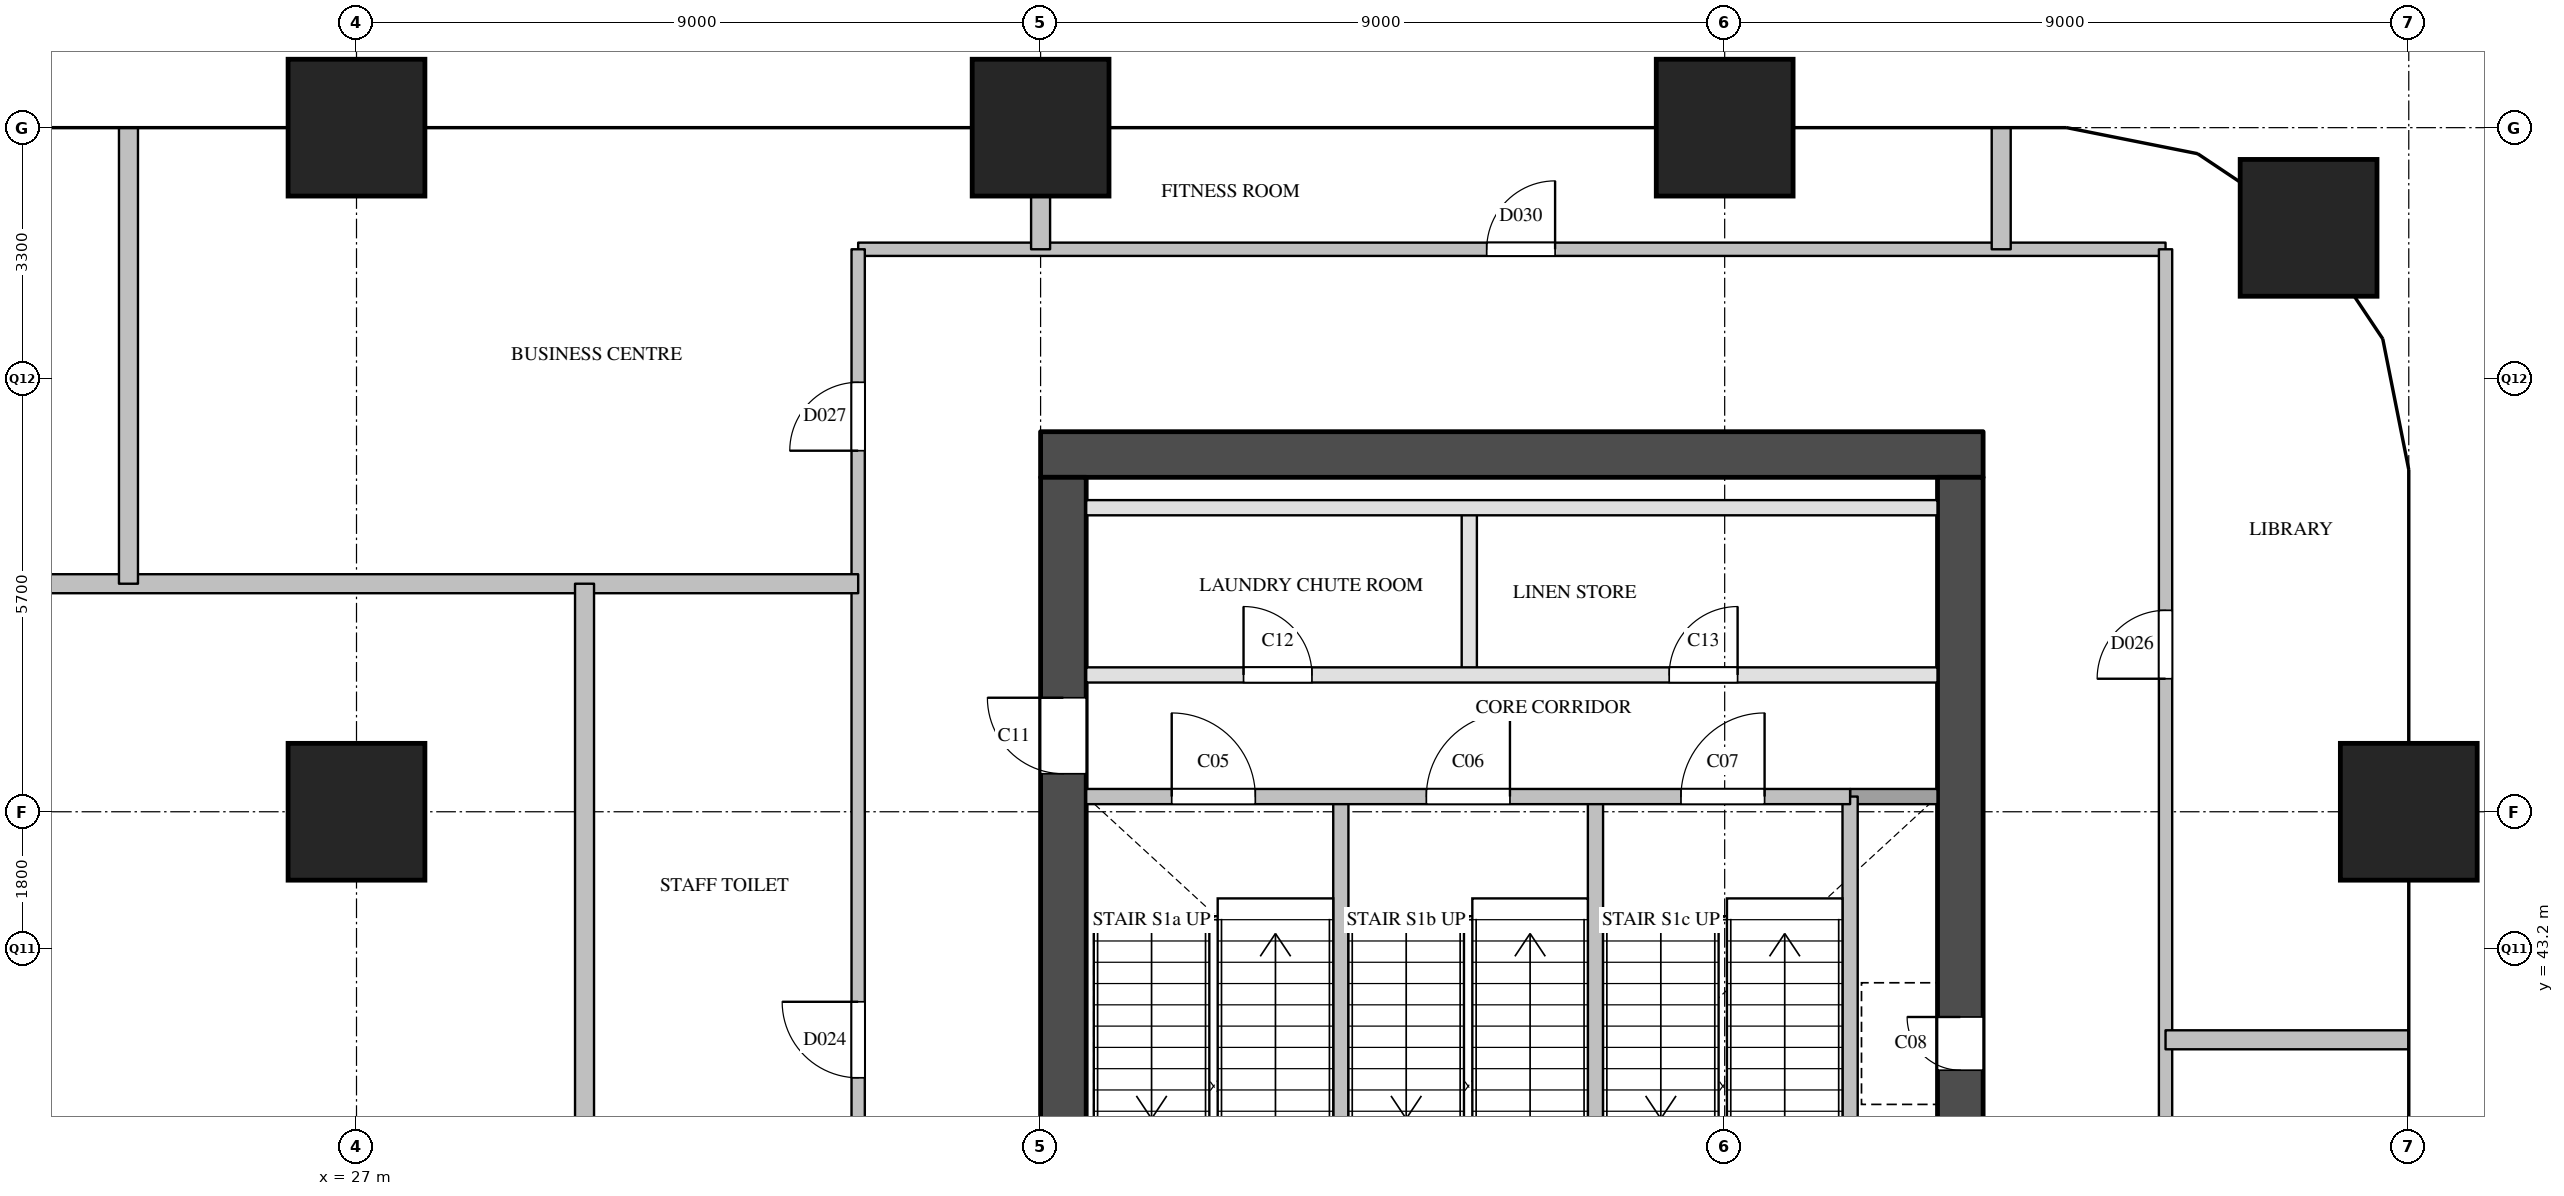
"""IFC4 building model, lengths in metres.
Left out: names, types, materials, properties, quantities, classifications, styles, units other than length and angle.
Written with IfcOpenShell. Run it as: python <this file> out.ifc"""

import sys

from ifc_helpers import new_model, si_unit, direction, frame, frame_2d, origin, origin_2d, place, context, subcontext, project, spatial, rectangle, extrude, element, fill, save


model = new_model("IFC4")
c1 = context("Model", 3, precision=1e-05, world=origin(), true_north=direction((0.0, 1.0)))
c2 = subcontext(c1, "Body", "Model", "MODEL_VIEW")
j1 = project(units=[si_unit("LENGTHUNIT", "METRE"), si_unit("PLANEANGLEUNIT", "RADIAN")], contexts=[c1])
p1 = place(None, origin())
s1 = spatial("IfcSite", under=j1, at=p1, CompositionType="ELEMENT")
p2 = place(p1, origin())
s2 = spatial("IfcBuilding", under=s1, at=p2, CompositionType="ELEMENT")
p3 = place(p2, frame((0.0, 0.0, 65.2)))
s3 = spatial("IfcBuildingStorey", under=s2, at=p3, CompositionType="ELEMENT", Elevation=65.2)
for number, where, z_axis, x_axis in (
    (1, (27.0, 45.0, 0.0), (0.0, 0.0, 1.0), (1.0, 0.0, 0.0)),
    (2, (27.0, 54.0, 0.0), (0.0, 0.0, 1.0), (1.0, 0.0, 0.0)),
    (3, (36.0, 54.0, 0.0), (0.0, 0.0, 1.0), (1.0, 0.0, 0.0)),
    (4, (45.0, 54.0, 0.0), (0.0, 0.0, 1.0), (1.0, 0.0, 0.0)),
    (5, (54.0, 45.0, 0.0), (0.0, 0.0, 1.0), (1.0, 0.0, 0.0)),
    (6, (52.682, 52.682, 0.0), (0.0, 0.0, 1.0), (1.0, 0.0, 0.0)),
):
    element("IfcColumn", number, at=place(p3, frame(where, z_axis=z_axis, x_axis=x_axis)), inside=s3, PredefinedType="COLUMN", context=c2, shape_type="SweptSolid", body=[
        extrude(rectangle(XDim=1.8, YDim=1.8, at=origin_2d()), origin(), (0.0, 0.0, 1.0), 3.8),
    ])
p4 = place(p3, frame((36.0, 49.7, 0.0), z_axis=(0.0, 0.0, 1.0), x_axis=(1.0, 0.0, 0.0)))
e7 = element("IfcWall", 7, at=p4, inside=s3, PredefinedType="SHEAR", context=c2, shape_type="SweptSolid", body=[
    extrude(rectangle(XDim=12.4, YDim=0.6, at=frame_2d((6.2, 0.0))), origin(), (0.0, 0.0, 1.0), 3.5),
])
p5 = place(p3, frame((36.3, 29.1, 0.0), z_axis=(0.0, 0.0, 1.0), x_axis=(0.0, 1.0, 0.0)))
e8 = element("IfcWall", 8, at=p5, inside=s3, PredefinedType="SHEAR", context=c2, shape_type="SweptSolid", body=[
    extrude(rectangle(XDim=20.3, YDim=0.6, at=frame_2d((10.15, 0.0))), origin(), (0.0, 0.0, 1.0), 3.5),
])
p6 = place(p5, frame((3.6, 0.0, 0.0)))
e9 = element("IfcOpeningElement", 9, at=p6, cuts=e8, PredefinedType="OPENING", context=c2, shape_type="SweptSolid", body=[
    extrude(rectangle(XDim=1.8, YDim=2.1, at=frame_2d((0.9, 1.05))), frame((0.0, 0.31, 0.0), z_axis=(0.0, -1.0, 0.0), x_axis=(1.0, 0.0, 0.0)), (0.0, 0.0, 1.0), 0.62),
])
p7 = place(p5, frame((16.4, 0.0, 0.0)))
e10 = element("IfcOpeningElement", 10, at=p7, cuts=e8, PredefinedType="OPENING", context=c2, shape_type="SweptSolid", body=[
    extrude(rectangle(XDim=1.0, YDim=2.1, at=frame_2d((0.5, 1.05))), frame((0.0, 0.31, 0.0), z_axis=(0.0, -1.0, 0.0), x_axis=(1.0, 0.0, 0.0)), (0.0, 0.0, 1.0), 0.62),
])
p8 = place(p3, frame((48.1, 29.1, 0.0), z_axis=(0.0, 0.0, 1.0), x_axis=(0.0, 1.0, 0.0)))
e11 = element("IfcWall", 11, at=p8, inside=s3, PredefinedType="SHEAR", context=c2, shape_type="SweptSolid", body=[
    extrude(rectangle(XDim=20.3, YDim=0.6, at=frame_2d((10.15, 0.0))), origin(), (0.0, 0.0, 1.0), 3.5),
])
p9 = place(p8, frame((12.5, 0.0, 0.0)))
e12 = element("IfcOpeningElement", 12, at=p9, cuts=e11, PredefinedType="OPENING", context=c2, shape_type="SweptSolid", body=[
    extrude(rectangle(XDim=0.7, YDim=2.1, at=frame_2d((0.35, 1.05))), frame((0.0, 0.31, 0.0), z_axis=(0.0, -1.0, 0.0), x_axis=(1.0, 0.0, 0.0)), (0.0, 0.0, 1.0), 0.62),
])
p10 = place(p8, frame((3.9, 0.0, 0.0)))
e13 = element("IfcOpeningElement", 13, at=p10, cuts=e11, PredefinedType="OPENING", context=c2, shape_type="SweptSolid", body=[
    extrude(rectangle(XDim=1.8, YDim=2.1, at=frame_2d((0.9, 1.05))), frame((0.0, 0.31, 0.0), z_axis=(0.0, -1.0, 0.0), x_axis=(1.0, 0.0, 0.0)), (0.0, 0.0, 1.0), 0.62),
])
p11 = place(p3, frame((39.95, 40.78, 0.0), z_axis=(0.0, 0.0, 1.0), x_axis=(0.0, 1.0, 0.0)))
e14 = element("IfcWall", 14, at=p11, inside=s3, PredefinedType="SOLIDWALL", context=c2, shape_type="SweptSolid", body=[
    extrude(rectangle(XDim=4.42, YDim=0.2, at=frame_2d((2.21, 0.0))), origin(), (0.0, 0.0, 1.0), 3.5),
])
p12 = place(p3, frame((41.64, 46.8, 0.0), z_axis=(0.0, 0.0, 1.0), x_axis=(0.0, 1.0, 0.0)))
e15 = element("IfcWall", 15, at=p12, inside=s3, PredefinedType="PARTITIONING", context=c2, shape_type="SweptSolid", body=[
    extrude(rectangle(XDim=2.2, YDim=0.2, at=frame_2d((1.1, 0.0))), origin(), (0.0, 0.0, 1.0), 3.5),
])
for number, where, z_axis, x_axis in (
    (16, (43.3, 40.78, 0.0), (0.0, 0.0, 1.0), (0.0, 1.0, 0.0)),
    (17, (46.65, 40.78, 0.0), (0.0, 0.0, 1.0), (0.0, 1.0, 0.0)),
):
    element("IfcWall", number, at=place(p3, frame(where, z_axis=z_axis, x_axis=x_axis)), inside=s3, PredefinedType="SOLIDWALL", context=c2, shape_type="SweptSolid", body=[
        extrude(rectangle(XDim=4.42, YDim=0.2, at=frame_2d((2.21, 0.0))), origin(), (0.0, 0.0, 1.0), 3.5),
    ])
p13 = place(p3, frame((46.65, 45.2, 0.0), z_axis=(0.0, 0.0, 1.0), x_axis=(1.0, 0.0, 0.0)))
e18 = element("IfcWall", 18, at=p13, inside=s3, PredefinedType="SOLIDWALL", context=c2, shape_type="SweptSolid", body=[
    extrude(rectangle(XDim=1.15, YDim=0.2, at=frame_2d((0.575, 0.0))), origin(), (0.0, 0.0, 1.0), 3.5),
])
p14 = place(p3, frame((36.6, 45.2, 0.0), z_axis=(0.0, 0.0, 1.0), x_axis=(1.0, 0.0, 0.0)))
e19 = element("IfcWall", 19, at=p14, inside=s3, PredefinedType="SOLIDWALL", context=c2, shape_type="SweptSolid", body=[
    extrude(rectangle(XDim=10.05, YDim=0.2, at=frame_2d((5.025, 0.0))), origin(), (0.0, 0.0, 1.0), 3.5),
])
p15 = place(p14, frame((1.125, 0.0, 0.0)))
e20 = element("IfcOpeningElement", 20, at=p15, cuts=e19, PredefinedType="OPENING", context=c2, shape_type="SweptSolid", body=[
    extrude(rectangle(XDim=1.1, YDim=2.1, at=frame_2d((0.55, 1.05))), frame((0.0, 0.11, 0.0), z_axis=(0.0, -1.0, 0.0), x_axis=(1.0, 0.0, 0.0)), (0.0, 0.0, 1.0), 0.22),
])
p16 = place(p14, frame((4.475, 0.0, 0.0)))
e21 = element("IfcOpeningElement", 21, at=p16, cuts=e19, PredefinedType="OPENING", context=c2, shape_type="SweptSolid", body=[
    extrude(rectangle(XDim=1.1, YDim=2.1, at=frame_2d((0.55, 1.05))), frame((0.0, 0.11, 0.0), z_axis=(0.0, -1.0, 0.0), x_axis=(1.0, 0.0, 0.0)), (0.0, 0.0, 1.0), 0.22),
])
p17 = place(p14, frame((7.825, 0.0, 0.0)))
e22 = element("IfcOpeningElement", 22, at=p17, cuts=e19, PredefinedType="OPENING", context=c2, shape_type="SweptSolid", body=[
    extrude(rectangle(XDim=1.1, YDim=2.1, at=frame_2d((0.55, 1.05))), frame((0.0, 0.11, 0.0), z_axis=(0.0, -1.0, 0.0), x_axis=(1.0, 0.0, 0.0)), (0.0, 0.0, 1.0), 0.22),
])
p18 = place(p3, frame((36.6, 46.8, 0.0), z_axis=(0.0, 0.0, 1.0), x_axis=(1.0, 0.0, 0.0)))
e23 = element("IfcWall", 23, at=p18, inside=s3, PredefinedType="PARTITIONING", context=c2, shape_type="SweptSolid", body=[
    extrude(rectangle(XDim=11.2, YDim=0.2, at=frame_2d((5.6, 0.0))), origin(), (0.0, 0.0, 1.0), 3.5),
])
p19 = place(p18, frame((2.07, 0.0, 0.0)))
e24 = element("IfcOpeningElement", 24, at=p19, cuts=e23, PredefinedType="OPENING", context=c2, shape_type="SweptSolid", body=[
    extrude(rectangle(XDim=0.9, YDim=2.1, at=frame_2d((0.45, 1.05))), frame((0.0, 0.11, 0.0), z_axis=(0.0, -1.0, 0.0), x_axis=(1.0, 0.0, 0.0)), (0.0, 0.0, 1.0), 0.22),
])
p20 = place(p18, frame((7.67, 0.0, 0.0)))
e25 = element("IfcOpeningElement", 25, at=p20, cuts=e23, PredefinedType="OPENING", context=c2, shape_type="SweptSolid", body=[
    extrude(rectangle(XDim=0.9, YDim=2.1, at=frame_2d((0.45, 1.05))), frame((0.0, 0.11, 0.0), z_axis=(0.0, -1.0, 0.0), x_axis=(1.0, 0.0, 0.0)), (0.0, 0.0, 1.0), 0.22),
])
p21 = place(p3, frame((36.6, 49.0, 0.0), z_axis=(0.0, 0.0, 1.0), x_axis=(1.0, 0.0, 0.0)))
e26 = element("IfcWall", 26, at=p21, inside=s3, PredefinedType="PARTITIONING", context=c2, shape_type="SweptSolid", body=[
    extrude(rectangle(XDim=11.2, YDim=0.2, at=frame_2d((5.6, 0.0))), origin(), (0.0, 0.0, 1.0), 3.5),
])
p22 = place(p3, frame((33.6, 52.4, 0.0), z_axis=(0.0, 0.0, 1.0), x_axis=(1.0, 0.0, 0.0)))
e27 = element("IfcWall", 27, at=p22, inside=s3, PredefinedType="PARTITIONING", context=c2, shape_type="SweptSolid", body=[
    extrude(rectangle(XDim=17.2, YDim=0.175, at=frame_2d((8.6, 0.0))), origin(), (0.0, 0.0, 1.0), 3.5),
])
p23 = place(p22, frame((8.269, 0.0, 0.0)))
e28 = element("IfcOpeningElement", 28, at=p23, cuts=e27, PredefinedType="OPENING", context=c2, shape_type="SweptSolid", body=[
    extrude(rectangle(XDim=0.9, YDim=2.1, at=frame_2d((0.45, 1.05))), frame((0.0, 0.097, 0.0), z_axis=(0.0, -1.0, 0.0), x_axis=(1.0, 0.0, 0.0)), (0.0, 0.0, 1.0), 0.195),
])
p24 = place(p3, frame((33.6, 26.1, 0.0), z_axis=(0.0, 0.0, 1.0), x_axis=(0.0, 1.0, 0.0)))
e29 = element("IfcWall", 29, at=p24, inside=s3, PredefinedType="PARTITIONING", context=c2, shape_type="SweptSolid", body=[
    extrude(rectangle(XDim=26.3, YDim=0.175, at=frame_2d((13.15, 0.0))), origin(), (0.0, 0.0, 1.0), 2.5),
])
p25 = place(p24, frame((4.5, 0.0, 0.0)))
e30 = element("IfcOpeningElement", 30, at=p25, cuts=e29, PredefinedType="OPENING", context=c2, shape_type="SweptSolid", body=[
    extrude(rectangle(XDim=0.9, YDim=2.1, at=frame_2d((0.45, 1.05))), frame((0.0, 0.097, 0.0), z_axis=(0.0, -1.0, 0.0), x_axis=(1.0, 0.0, 0.0)), (0.0, 0.0, 1.0), 0.195),
])
p26 = place(p24, frame((15.4, 0.0, 0.0)))
e31 = element("IfcOpeningElement", 31, at=p26, cuts=e29, PredefinedType="OPENING", context=c2, shape_type="SweptSolid", body=[
    extrude(rectangle(XDim=1.0, YDim=2.1, at=frame_2d((0.5, 1.05))), frame((0.0, 0.097, 0.0), z_axis=(0.0, -1.0, 0.0), x_axis=(1.0, 0.0, 0.0)), (0.0, 0.0, 1.0), 0.195),
])
p27 = place(p24, frame((23.65, 0.0, 0.0)))
e32 = element("IfcOpeningElement", 32, at=p27, cuts=e29, PredefinedType="OPENING", context=c2, shape_type="SweptSolid", body=[
    extrude(rectangle(XDim=0.9, YDim=2.1, at=frame_2d((0.45, 1.05))), frame((0.0, 0.097, 0.0), z_axis=(0.0, -1.0, 0.0), x_axis=(1.0, 0.0, 0.0)), (0.0, 0.0, 1.0), 0.195),
])
p28 = place(p3, frame((50.8, 26.1, 0.0), z_axis=(0.0, 0.0, 1.0), x_axis=(0.0, 1.0, 0.0)))
e33 = element("IfcWall", 33, at=p28, inside=s3, PredefinedType="PARTITIONING", context=c2, shape_type="SweptSolid", body=[
    extrude(rectangle(XDim=26.3, YDim=0.175, at=frame_2d((13.15, 0.0))), origin(), (0.0, 0.0, 1.0), 2.5),
])
p29 = place(p28, frame((4.5, 0.0, 0.0)))
e34 = element("IfcOpeningElement", 34, at=p29, cuts=e33, PredefinedType="OPENING", context=c2, shape_type="SweptSolid", body=[
    extrude(rectangle(XDim=0.9, YDim=2.1, at=frame_2d((0.45, 1.05))), frame((0.0, 0.097, 0.0), z_axis=(0.0, -1.0, 0.0), x_axis=(1.0, 0.0, 0.0)), (0.0, 0.0, 1.0), 0.195),
])
p30 = place(p28, frame((12.45, 0.0, 0.0)))
e35 = element("IfcOpeningElement", 35, at=p30, cuts=e33, PredefinedType="OPENING", context=c2, shape_type="SweptSolid", body=[
    extrude(rectangle(XDim=0.9, YDim=2.1, at=frame_2d((0.45, 1.05))), frame((0.0, 0.097, 0.0), z_axis=(0.0, -1.0, 0.0), x_axis=(1.0, 0.0, 0.0)), (0.0, 0.0, 1.0), 0.195),
])
p31 = place(p28, frame((20.65, 0.0, 0.0)))
e36 = element("IfcOpeningElement", 36, at=p31, cuts=e33, PredefinedType="OPENING", context=c2, shape_type="SweptSolid", body=[
    extrude(rectangle(XDim=0.9, YDim=2.1, at=frame_2d((0.45, 1.05))), frame((0.0, 0.097, 0.0), z_axis=(0.0, -1.0, 0.0), x_axis=(1.0, 0.0, 0.0)), (0.0, 0.0, 1.0), 0.195),
])
p32 = place(p3, frame((50.8, 42.0, 0.0), z_axis=(0.0, 0.0, 1.0), x_axis=(1.0, 0.0, 0.0)))
e37 = element("IfcWall", 37, at=p32, inside=s3, PredefinedType="PARTITIONING", context=c2, shape_type="SweptSolid", body=[
    extrude(rectangle(XDim=3.2, YDim=0.25, at=frame_2d((1.6, 0.0))), origin(), (0.0, 0.0, 1.0), 2.5),
])
p33 = place(p3, frame((20.4, 48.0, 0.0), z_axis=(0.0, 0.0, 1.0), x_axis=(1.0, 0.0, 0.0)))
e38 = element("IfcWall", 38, at=p33, inside=s3, PredefinedType="PARTITIONING", context=c2, shape_type="SweptSolid", body=[
    extrude(rectangle(XDim=13.2, YDim=0.25, at=frame_2d((6.6, 0.0))), origin(), (0.0, 0.0, 1.0), 2.5),
])
p34 = place(p3, frame((24.0, 48.0, 0.0), z_axis=(0.0, 0.0, 1.0), x_axis=(0.0, 1.0, 0.0)))
e39 = element("IfcWall", 39, at=p34, inside=s3, PredefinedType="PARTITIONING", context=c2, shape_type="SweptSolid", body=[
    extrude(rectangle(XDim=6.0, YDim=0.25, at=frame_2d((3.0, 0.0))), origin(), (0.0, 0.0, 1.0), 2.5),
])
p35 = place(p3, frame((30.0, 36.0, 0.0), z_axis=(0.0, 0.0, 1.0), x_axis=(0.0, 1.0, 0.0)))
e40 = element("IfcWall", 40, at=p35, inside=s3, PredefinedType="PARTITIONING", context=c2, shape_type="SweptSolid", body=[
    extrude(rectangle(XDim=12.0, YDim=0.25, at=frame_2d((6.0, 0.0))), origin(), (0.0, 0.0, 1.0), 3.5),
])
p36 = place(p3, frame((36.0, 52.4, 0.0), z_axis=(0.0, 0.0, 1.0), x_axis=(0.0, 1.0, 0.0)))
e41 = element("IfcWall", 41, at=p36, inside=s3, PredefinedType="PARTITIONING", context=c2, shape_type="SweptSolid", body=[
    extrude(rectangle(XDim=1.6, YDim=0.25, at=frame_2d((0.8, 0.0))), origin(), (0.0, 0.0, 1.0), 3.5),
])
p37 = place(p3, frame((48.638, 52.4, 0.0), z_axis=(0.0, 0.0, 1.0), x_axis=(0.0, 1.0, 0.0)))
e42 = element("IfcWall", 42, at=p37, inside=s3, PredefinedType="PARTITIONING", context=c2, shape_type="SweptSolid", body=[
    extrude(rectangle(XDim=1.6, YDim=0.25, at=frame_2d((0.8, 0.0))), origin(), (0.0, 0.0, 1.0), 2.5),
])
p38 = place(p15, origin())
e43 = element("IfcDoor", 43, at=p38, inside=s3, OperationType="SINGLE_SWING_LEFT", PredefinedType="DOOR", context=c2, shape_type="SweptSolid", body=[
    extrude(rectangle(XDim=1.1, YDim=2.1, at=frame_2d((0.55, 1.05))), frame((0.0, 0.025, 0.0), z_axis=(0.0, -1.0, 0.0), x_axis=(1.0, 0.0, 0.0)), (0.0, 0.0, 1.0), 0.05),
])
fill(e20, e43)
p39 = place(p16, origin())
e44 = element("IfcDoor", 44, at=p39, inside=s3, OperationType="SINGLE_SWING_RIGHT", PredefinedType="DOOR", context=c2, shape_type="SweptSolid", body=[
    extrude(rectangle(XDim=1.1, YDim=2.1, at=frame_2d((0.55, 1.05))), frame((0.0, 0.025, 0.0), z_axis=(0.0, -1.0, 0.0), x_axis=(1.0, 0.0, 0.0)), (0.0, 0.0, 1.0), 0.05),
])
fill(e21, e44)
p40 = place(p17, origin())
e45 = element("IfcDoor", 45, at=p40, inside=s3, OperationType="SINGLE_SWING_RIGHT", PredefinedType="DOOR", context=c2, shape_type="SweptSolid", body=[
    extrude(rectangle(XDim=1.1, YDim=2.1, at=frame_2d((0.55, 1.05))), frame((0.0, 0.025, 0.0), z_axis=(0.0, -1.0, 0.0), x_axis=(1.0, 0.0, 0.0)), (0.0, 0.0, 1.0), 0.05),
])
fill(e22, e45)
p41 = place(p9, origin())
e46 = element("IfcDoor", 46, at=p41, inside=s3, OperationType="SINGLE_SWING_RIGHT", PredefinedType="DOOR", context=c2, shape_type="SweptSolid", body=[
    extrude(rectangle(XDim=0.7, YDim=2.1, at=frame_2d((0.35, 1.05))), frame((0.0, 0.025, 0.0), z_axis=(0.0, -1.0, 0.0), x_axis=(1.0, 0.0, 0.0)), (0.0, 0.0, 1.0), 0.05),
])
fill(e12, e46)
p42 = place(p7, origin())
e47 = element("IfcDoor", 47, at=p42, inside=s3, OperationType="SINGLE_SWING_RIGHT", PredefinedType="DOOR", context=c2, shape_type="SweptSolid", body=[
    extrude(rectangle(XDim=1.0, YDim=2.1, at=frame_2d((0.5, 1.05))), frame((0.0, 0.025, 0.0), z_axis=(0.0, -1.0, 0.0), x_axis=(1.0, 0.0, 0.0)), (0.0, 0.0, 1.0), 0.05),
])
fill(e10, e47)
p43 = place(p19, origin())
e48 = element("IfcDoor", 48, at=p43, inside=s3, OperationType="SINGLE_SWING_LEFT", PredefinedType="DOOR", context=c2, shape_type="SweptSolid", body=[
    extrude(rectangle(XDim=0.9, YDim=2.1, at=frame_2d((0.45, 1.05))), frame((0.0, 0.025, 0.0), z_axis=(0.0, -1.0, 0.0), x_axis=(1.0, 0.0, 0.0)), (0.0, 0.0, 1.0), 0.05),
])
fill(e24, e48)
p44 = place(p20, origin())
e49 = element("IfcDoor", 49, at=p44, inside=s3, OperationType="SINGLE_SWING_RIGHT", PredefinedType="DOOR", context=c2, shape_type="SweptSolid", body=[
    extrude(rectangle(XDim=0.9, YDim=2.1, at=frame_2d((0.45, 1.05))), frame((0.0, 0.025, 0.0), z_axis=(0.0, -1.0, 0.0), x_axis=(1.0, 0.0, 0.0)), (0.0, 0.0, 1.0), 0.05),
])
fill(e25, e49)
p45 = place(p26, origin())
e50 = element("IfcDoor", 50, at=p45, inside=s3, OperationType="SINGLE_SWING_RIGHT", PredefinedType="DOOR", context=c2, shape_type="SweptSolid", body=[
    extrude(rectangle(XDim=1.0, YDim=2.1, at=frame_2d((0.5, 1.05))), frame((0.0, 0.025, 0.0), z_axis=(0.0, -1.0, 0.0), x_axis=(1.0, 0.0, 0.0)), (0.0, 0.0, 1.0), 0.05),
])
fill(e31, e50)
p46 = place(p31, origin())
e51 = element("IfcDoor", 51, at=p46, inside=s3, OperationType="SINGLE_SWING_LEFT", PredefinedType="DOOR", context=c2, shape_type="SweptSolid", body=[
    extrude(rectangle(XDim=0.9, YDim=2.1, at=frame_2d((0.45, 1.05))), frame((0.0, 0.025, 0.0), z_axis=(0.0, -1.0, 0.0), x_axis=(1.0, 0.0, 0.0)), (0.0, 0.0, 1.0), 0.05),
])
fill(e36, e51)
p47 = place(p27, origin())
e52 = element("IfcDoor", 52, at=p47, inside=s3, OperationType="SINGLE_SWING_LEFT", PredefinedType="DOOR", context=c2, shape_type="SweptSolid", body=[
    extrude(rectangle(XDim=0.9, YDim=2.1, at=frame_2d((0.45, 1.05))), frame((0.0, 0.025, 0.0), z_axis=(0.0, -1.0, 0.0), x_axis=(1.0, 0.0, 0.0)), (0.0, 0.0, 1.0), 0.05),
])
fill(e32, e52)
p48 = place(p23, origin())
e53 = element("IfcDoor", 53, at=p48, inside=s3, OperationType="SINGLE_SWING_RIGHT", PredefinedType="DOOR", context=c2, shape_type="SweptSolid", body=[
    extrude(rectangle(XDim=0.9, YDim=2.1, at=frame_2d((0.45, 1.05))), frame((0.0, 0.025, 0.0), z_axis=(0.0, -1.0, 0.0), x_axis=(1.0, 0.0, 0.0)), (0.0, 0.0, 1.0), 0.05),
])
fill(e28, e53)
save(model, sys.argv[1])
